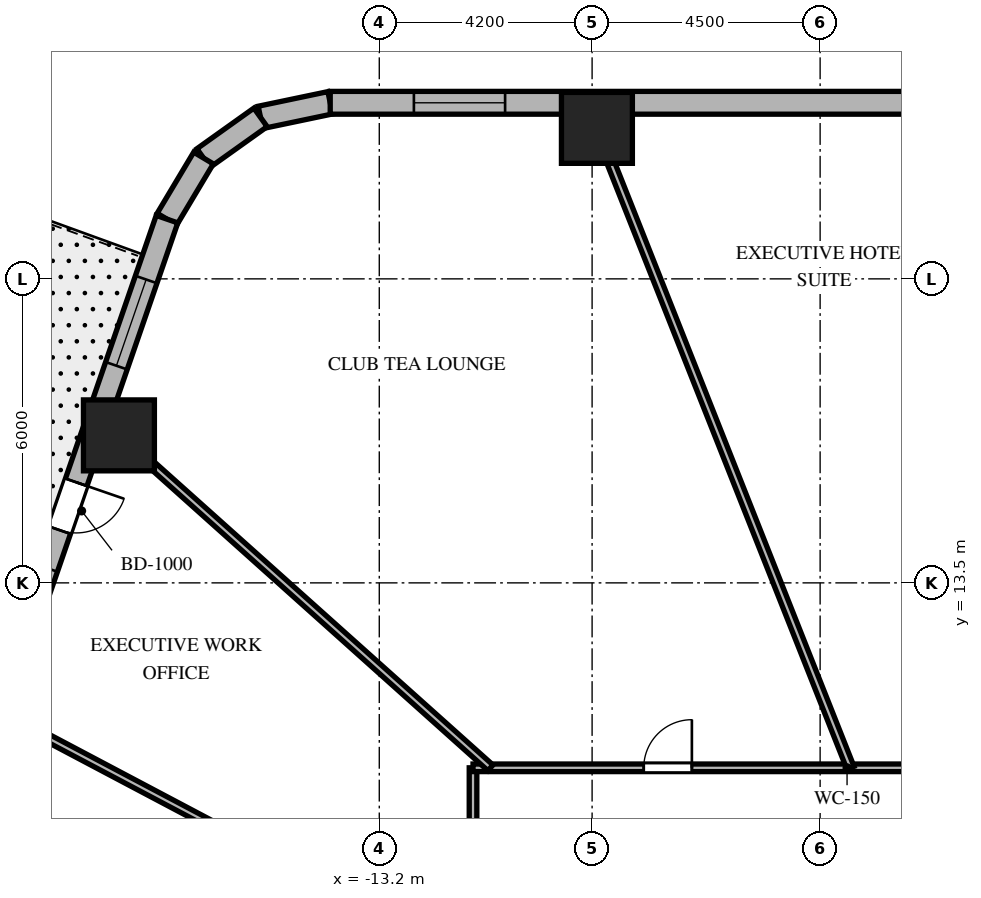
"""IFC4 building model, lengths in metres.
Left out: names, types, materials, properties, quantities, classifications, styles, units other than length and angle.
Written with IfcOpenShell. Run it as: python <this file> out.ifc"""

import sys

from ifc_helpers import new_model, si_unit, direction, frame, frame_2d, origin, origin_2d, place, context, subcontext, project, spatial, rectangle, extrude, element, fill, save


model = new_model("IFC4")
c1 = context("Model", 3, precision=1e-05, world=origin(), true_north=direction((0.0, 1.0)))
c2 = subcontext(c1, "Body", "Model", "MODEL_VIEW")
j1 = project(units=[si_unit("LENGTHUNIT", "METRE"), si_unit("PLANEANGLEUNIT", "RADIAN")], contexts=[c1])
p1 = place(None, origin())
s1 = spatial("IfcSite", under=j1, at=p1, CompositionType="ELEMENT")
p2 = place(p1, origin())
s2 = spatial("IfcBuilding", under=s1, at=p2, CompositionType="ELEMENT")
p3 = place(p2, frame((0.0, 0.0, 82.3)))
s3 = spatial("IfcBuildingStorey", under=s2, at=p3, CompositionType="ELEMENT", Elevation=82.3)
for number, where, z_axis, x_axis in (
    (1, (-8.905, 22.48, 0.0), (0.0, 0.0, 1.0), (1.0, 0.0, 0.0)),
    (2, (-18.338, 16.411, 0.0), (0.0, 0.0, 1.0), (1.0, 0.0, 0.0)),
):
    element("IfcColumn", number, at=place(p3, frame(where, z_axis=z_axis, x_axis=x_axis)), inside=s3, PredefinedType="COLUMN", context=c2, shape_type="SweptSolid", body=[
        extrude(rectangle(XDim=1.4, YDim=1.4, at=origin_2d()), origin(), (0.0, 0.0, 1.0), 3.7),
    ])
p4 = place(p3, frame((-14.168, 22.975, 0.0), z_axis=(0.0, 0.0, 1.0), x_axis=(-0.978770371074, -0.204959900243, 0.0)))
e3 = element("IfcWall", 3, at=p4, inside=s3, PredefinedType="SOLIDWALL", context=c2, shape_type="SweptSolid", body=[
    extrude(rectangle(XDim=1.406, YDim=0.45, at=frame_2d((0.703, 0.0))), origin(), (0.0, 0.0, 1.0), 3.38),
])
p5 = place(p3, frame((-15.544, 22.687, 0.0), z_axis=(0.0, 0.0, 1.0), x_axis=(-0.814210854316, -0.580569276412, 0.0)))
e4 = element("IfcWall", 4, at=p5, inside=s3, PredefinedType="SOLIDWALL", context=c2, shape_type="SweptSolid", body=[
    extrude(rectangle(XDim=1.381, YDim=0.45, at=frame_2d((0.691, 0.0))), origin(), (0.0, 0.0, 1.0), 3.38),
])
p6 = place(p3, frame((-16.669, 21.885, 0.0), z_axis=(0.0, 0.0, 1.0), x_axis=(-0.512936712947, -0.858426425799, 0.0)))
e5 = element("IfcWall", 5, at=p6, inside=s3, PredefinedType="SOLIDWALL", context=c2, shape_type="SweptSolid", body=[
    extrude(rectangle(XDim=1.406, YDim=0.45, at=frame_2d((0.703, 0.0))), origin(), (0.0, 0.0, 1.0), 3.38),
])
p7 = place(p3, frame((12.221, 22.975, 0.0), z_axis=(0.0, 0.0, 1.0), x_axis=(-1.0, 0.0, 0.0)))
e6 = element("IfcWall", 6, at=p7, inside=s3, PredefinedType="SOLIDWALL", context=c2, shape_type="SweptSolid", body=[
    extrude(rectangle(XDim=26.389, YDim=0.45, at=frame_2d((13.195, 0.0))), origin(), (0.0, 0.0, 1.0), 3.38),
])
p8 = place(p7, frame((1.653, 0.0, 0.8)))
e7 = element("IfcOpeningElement", 7, at=p8, cuts=e6, PredefinedType="OPENING", context=c2, shape_type="SweptSolid", body=[
    extrude(rectangle(XDim=1.8, YDim=1.8, at=frame_2d((0.9, 0.9))), frame((0.0, 0.235, 0.0), z_axis=(0.0, -1.0, 0.0), x_axis=(1.0, 0.0, 0.0)), (0.0, 0.0, 1.0), 0.47),
])
p9 = place(p7, frame((12.296, 0.0, 0.8)))
e8 = element("IfcOpeningElement", 8, at=p9, cuts=e6, PredefinedType="OPENING", context=c2, shape_type="SweptSolid", body=[
    extrude(rectangle(XDim=1.8, YDim=1.8, at=frame_2d((0.9, 0.9))), frame((0.0, 0.235, 0.0), z_axis=(0.0, -1.0, 0.0), x_axis=(1.0, 0.0, 0.0)), (0.0, 0.0, 1.0), 0.47),
])
p10 = place(p7, frame((22.938, 0.0, 0.8)))
e9 = element("IfcOpeningElement", 9, at=p10, cuts=e6, PredefinedType="OPENING", context=c2, shape_type="SweptSolid", body=[
    extrude(rectangle(XDim=1.8, YDim=1.8, at=frame_2d((0.9, 0.9))), frame((0.0, 0.235, 0.0), z_axis=(0.0, -1.0, 0.0), x_axis=(1.0, 0.0, 0.0)), (0.0, 0.0, 1.0), 0.47),
])
p11 = place(p3, frame((-17.39, 20.678, 0.0), z_axis=(0.0, 0.0, 1.0), x_axis=(-0.326068018294, -0.945346310854, 0.0)))
e10 = element("IfcWall", 10, at=p11, inside=s3, PredefinedType="SOLIDWALL", context=c2, shape_type="SweptSolid", body=[
    extrude(rectangle(XDim=21.793, YDim=0.45, at=frame_2d((10.896, 0.0))), origin(), (0.0, 0.0, 1.0), 3.38),
])
p12 = place(p11, frame((5.493, 0.0, 0.0)))
e11 = element("IfcOpeningElement", 11, at=p12, cuts=e10, PredefinedType="OPENING", context=c2, shape_type="SweptSolid", body=[
    extrude(rectangle(XDim=1.0, YDim=2.15, at=frame_2d((0.5, 1.075))), frame((0.0, 0.235, 0.0), z_axis=(0.0, -1.0, 0.0), x_axis=(1.0, 0.0, 0.0)), (0.0, 0.0, 1.0), 0.47),
])
p13 = place(p11, frame((1.26, 0.0, 0.8)))
e12 = element("IfcOpeningElement", 12, at=p13, cuts=e10, PredefinedType="OPENING", context=c2, shape_type="SweptSolid", body=[
    extrude(rectangle(XDim=1.8, YDim=1.8, at=frame_2d((0.9, 0.9))), frame((0.0, 0.235, 0.0), z_axis=(0.0, -1.0, 0.0), x_axis=(1.0, 0.0, 0.0)), (0.0, 0.0, 1.0), 0.47),
])
p14 = place(p11, frame((7.283, 0.0, 0.8)))
e13 = element("IfcOpeningElement", 13, at=p14, cuts=e10, PredefinedType="OPENING", context=c2, shape_type="SweptSolid", body=[
    extrude(rectangle(XDim=1.8, YDim=1.8, at=frame_2d((0.9, 0.9))), frame((0.0, 0.235, 0.0), z_axis=(0.0, -1.0, 0.0), x_axis=(1.0, 0.0, 0.0)), (0.0, 0.0, 1.0), 0.47),
])
p15 = place(p11, frame((12.736, 0.0, 0.8)))
e14 = element("IfcOpeningElement", 14, at=p15, cuts=e10, PredefinedType="OPENING", context=c2, shape_type="SweptSolid", body=[
    extrude(rectangle(XDim=1.8, YDim=1.8, at=frame_2d((0.9, 0.9))), frame((0.0, 0.235, 0.0), z_axis=(0.0, -1.0, 0.0), x_axis=(1.0, 0.0, 0.0)), (0.0, 0.0, 1.0), 0.47),
])
p16 = place(p11, frame((18.68, 0.0, 0.8)))
e15 = element("IfcOpeningElement", 15, at=p16, cuts=e10, PredefinedType="OPENING", context=c2, shape_type="SweptSolid", body=[
    extrude(rectangle(XDim=1.8, YDim=1.8, at=frame_2d((0.9, 0.9))), frame((0.0, 0.235, 0.0), z_axis=(0.0, -1.0, 0.0), x_axis=(1.0, 0.0, 0.0)), (0.0, 0.0, 1.0), 0.47),
])
p17 = place(p3, frame((-11.35, -9.85, 0.0), z_axis=(0.0, 0.0, 1.0), x_axis=(0.0, 1.0, 0.0)))
e16 = element("IfcWall", 16, at=p17, inside=s3, PredefinedType="PARTITIONING", context=c2, shape_type="SweptSolid", body=[
    extrude(rectangle(XDim=19.7, YDim=0.15, at=frame_2d((9.85, 0.0))), origin(), (0.0, 0.0, 1.0), 2.82),
])
p18 = place(p17, frame((17.206, 0.0, 0.0)))
e17 = element("IfcOpeningElement", 17, at=p18, cuts=e16, PredefinedType="OPENING", context=c2, shape_type="SweptSolid", body=[
    extrude(rectangle(XDim=0.9, YDim=2.03, at=frame_2d((0.45, 1.015))), frame((0.0, 0.085, 0.0), z_axis=(0.0, -1.0, 0.0), x_axis=(1.0, 0.0, 0.0)), (0.0, 0.0, 1.0), 0.17),
])
p19 = place(p17, frame((13.403, 0.0, 0.0)))
e18 = element("IfcOpeningElement", 18, at=p19, cuts=e16, PredefinedType="OPENING", context=c2, shape_type="SweptSolid", body=[
    extrude(rectangle(XDim=0.95, YDim=2.03, at=frame_2d((0.475, 1.015))), frame((0.0, 0.085, 0.0), z_axis=(0.0, -1.0, 0.0), x_axis=(1.0, 0.0, 0.0)), (0.0, 0.0, 1.0), 0.17),
])
p20 = place(p17, frame((10.134, 0.0, 0.0)))
e19 = element("IfcOpeningElement", 19, at=p20, cuts=e16, PredefinedType="OPENING", context=c2, shape_type="SweptSolid", body=[
    extrude(rectangle(XDim=0.95, YDim=2.03, at=frame_2d((0.475, 1.015))), frame((0.0, 0.085, 0.0), z_axis=(0.0, -1.0, 0.0), x_axis=(1.0, 0.0, 0.0)), (0.0, 0.0, 1.0), 0.17),
])
p21 = place(p17, frame((7.571, 0.0, 0.0)))
e20 = element("IfcOpeningElement", 20, at=p21, cuts=e16, PredefinedType="OPENING", context=c2, shape_type="SweptSolid", body=[
    extrude(rectangle(XDim=0.95, YDim=2.03, at=frame_2d((0.475, 1.015))), frame((0.0, 0.085, 0.0), z_axis=(0.0, -1.0, 0.0), x_axis=(1.0, 0.0, 0.0)), (0.0, 0.0, 1.0), 0.17),
])
p22 = place(p17, frame((3.024, 0.0, 0.0)))
e21 = element("IfcOpeningElement", 21, at=p22, cuts=e16, PredefinedType="OPENING", context=c2, shape_type="SweptSolid", body=[
    extrude(rectangle(XDim=0.95, YDim=2.03, at=frame_2d((0.475, 1.015))), frame((0.0, 0.085, 0.0), z_axis=(0.0, -1.0, 0.0), x_axis=(1.0, 0.0, 0.0)), (0.0, 0.0, 1.0), 0.17),
])
p23 = place(p3, frame((-11.35, 9.85, 0.0), z_axis=(0.0, 0.0, 1.0), x_axis=(1.0, 0.0, 0.0)))
e22 = element("IfcWall", 22, at=p23, inside=s3, PredefinedType="PARTITIONING", context=c2, shape_type="SweptSolid", body=[
    extrude(rectangle(XDim=22.7, YDim=0.15, at=frame_2d((11.35, 0.0))), origin(), (0.0, 0.0, 1.0), 2.82),
])
p24 = place(p23, frame((18.837, 0.0, 0.0)))
e23 = element("IfcOpeningElement", 23, at=p24, cuts=e22, PredefinedType="OPENING", context=c2, shape_type="SweptSolid", body=[
    extrude(rectangle(XDim=0.9, YDim=2.03, at=frame_2d((0.45, 1.015))), frame((0.0, 0.085, 0.0), z_axis=(0.0, -1.0, 0.0), x_axis=(1.0, 0.0, 0.0)), (0.0, 0.0, 1.0), 0.17),
])
p25 = place(p23, frame((15.532, 0.0, 0.0)))
e24 = element("IfcOpeningElement", 24, at=p25, cuts=e22, PredefinedType="OPENING", context=c2, shape_type="SweptSolid", body=[
    extrude(rectangle(XDim=0.95, YDim=2.03, at=frame_2d((0.475, 1.015))), frame((0.0, 0.085, 0.0), z_axis=(0.0, -1.0, 0.0), x_axis=(1.0, 0.0, 0.0)), (0.0, 0.0, 1.0), 0.17),
])
p26 = place(p23, frame((10.444, 0.0, 0.0)))
e25 = element("IfcOpeningElement", 25, at=p26, cuts=e22, PredefinedType="OPENING", context=c2, shape_type="SweptSolid", body=[
    extrude(rectangle(XDim=0.95, YDim=2.03, at=frame_2d((0.475, 1.015))), frame((0.0, 0.085, 0.0), z_axis=(0.0, -1.0, 0.0), x_axis=(1.0, 0.0, 0.0)), (0.0, 0.0, 1.0), 0.17),
])
p27 = place(p23, frame((3.369, 0.0, 0.0)))
e26 = element("IfcOpeningElement", 26, at=p27, cuts=e22, PredefinedType="OPENING", context=c2, shape_type="SweptSolid", body=[
    extrude(rectangle(XDim=0.95, YDim=2.03, at=frame_2d((0.475, 1.015))), frame((0.0, 0.085, 0.0), z_axis=(0.0, -1.0, 0.0), x_axis=(1.0, 0.0, 0.0)), (0.0, 0.0, 1.0), 0.17),
])
p28 = place(p3, frame((-3.902, 9.85, 0.0), z_axis=(0.0, 0.0, 1.0), x_axis=(-0.36828765711, 0.929711891728, 0.0)))
e27 = element("IfcWall", 27, at=p28, inside=s3, PredefinedType="PARTITIONING", context=c2, shape_type="SweptSolid", body=[
    extrude(rectangle(XDim=14.117, YDim=0.15, at=frame_2d((7.059, 0.0))), origin(), (0.0, 0.0, 1.0), 2.52),
])
p29 = place(p3, frame((-11.007, 9.85, 0.0), z_axis=(0.0, 0.0, 1.0), x_axis=(-0.745177305978, 0.666866390407, 0.0)))
e28 = element("IfcWall", 28, at=p29, inside=s3, PredefinedType="PARTITIONING", context=c2, shape_type="SweptSolid", body=[
    extrude(rectangle(XDim=10.375, YDim=0.15, at=frame_2d((5.188, 0.0))), origin(), (0.0, 0.0, 1.0), 2.52),
])
p30 = place(p3, frame((-11.35, 6.001, 0.0), z_axis=(0.0, 0.0, 1.0), x_axis=(-0.884022077319, 0.467445148453, 0.0)))
e29 = element("IfcWall", 29, at=p30, inside=s3, PredefinedType="PARTITIONING", context=c2, shape_type="SweptSolid", body=[
    extrude(rectangle(XDim=10.621, YDim=0.15, at=frame_2d((5.311, 0.0))), origin(), (0.0, 0.0, 1.0), 2.52),
])
p31 = place(p10, origin())
e30 = element("IfcWindow", 30, at=p31, inside=s3, PartitioningType="SINGLE_PANEL", PredefinedType="WINDOW", context=c2, shape_type="SweptSolid", body=[
    extrude(rectangle(XDim=1.8, YDim=1.8, at=frame_2d((0.9, 0.9))), frame((0.0, 0.03, 0.0), z_axis=(0.0, -1.0, 0.0), x_axis=(1.0, 0.0, 0.0)), (0.0, 0.0, 1.0), 0.06),
])
fill(e9, e30)
p32 = place(p12, origin())
e31 = element("IfcDoor", 31, at=p32, inside=s3, OperationType="SINGLE_SWING_LEFT", PredefinedType="DOOR", context=c2, shape_type="SweptSolid", body=[
    extrude(rectangle(XDim=1.0, YDim=2.15, at=frame_2d((0.5, 1.075))), frame((0.0, 0.025, 0.0), z_axis=(0.0, -1.0, 0.0), x_axis=(1.0, 0.0, 0.0)), (0.0, 0.0, 1.0), 0.05),
])
fill(e11, e31)
p33 = place(p13, origin())
e32 = element("IfcWindow", 32, at=p33, inside=s3, PartitioningType="SINGLE_PANEL", PredefinedType="WINDOW", context=c2, shape_type="SweptSolid", body=[
    extrude(rectangle(XDim=1.8, YDim=1.8, at=frame_2d((0.9, 0.9))), frame((0.0, 0.03, 0.0), z_axis=(0.0, -1.0, 0.0), x_axis=(1.0, 0.0, 0.0)), (0.0, 0.0, 1.0), 0.06),
])
fill(e12, e32)
p34 = place(p27, origin())
e33 = element("IfcDoor", 33, at=p34, inside=s3, OperationType="SINGLE_SWING_RIGHT", PredefinedType="DOOR", context=c2, shape_type="SweptSolid", body=[
    extrude(rectangle(XDim=0.95, YDim=2.03, at=frame_2d((0.475, 1.015))), frame((0.0, 0.025, 0.0), z_axis=(0.0, -1.0, 0.0), x_axis=(1.0, 0.0, 0.0)), (0.0, 0.0, 1.0), 0.05),
])
fill(e26, e33)
save(model, sys.argv[1])
